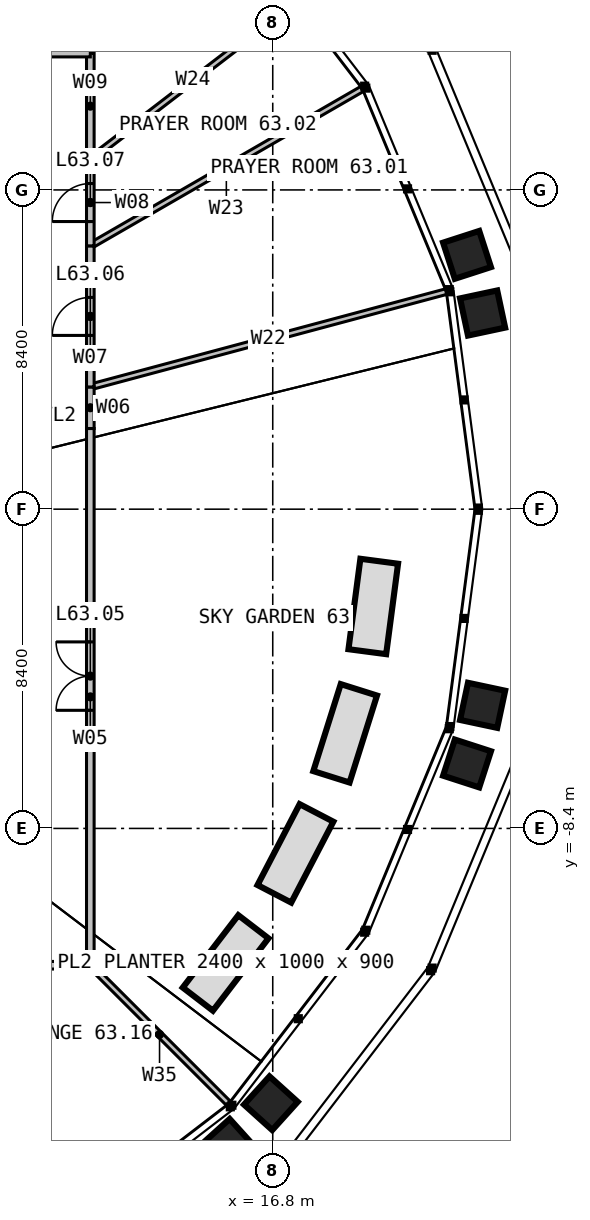
"""IFC4 building model, lengths in metres.
Left out: names, types, materials, properties, quantities, classifications, styles, units other than length and angle.
Written with IfcOpenShell. Run it as: python <this file> out.ifc"""

import sys

from ifc_helpers import new_model, si_unit, direction, frame, frame_2d, origin, place, context, subcontext, project, spatial, rectangle, extrude, element, fill, save


model = new_model("IFC4")
c1 = context("Model", 3, precision=1e-05, world=origin(), true_north=direction((0.0, 1.0)))
c2 = subcontext(c1, "Body", "Model", "MODEL_VIEW")
j1 = project(units=[si_unit("LENGTHUNIT", "METRE"), si_unit("PLANEANGLEUNIT", "RADIAN")], contexts=[c1])
p1 = place(None, origin())
s1 = spatial("IfcSite", under=j1, at=p1, CompositionType="ELEMENT")
p2 = place(p1, origin())
s2 = spatial("IfcBuilding", under=s1, at=p2, CompositionType="ELEMENT")
p3 = place(p2, frame((0.0, 0.0, 260.0)))
s3 = spatial("IfcBuildingStorey", under=s2, at=p3, CompositionType="ELEMENT", Elevation=260.0)
p4 = place(p3, frame((12.0, -12.0, 0.0), z_axis=(0.0, 0.0, 1.0), x_axis=(0.707106781187, -0.707106781187, 0.0)))
e1 = element("IfcWall", 1, at=p4, inside=s3, PredefinedType="PARTITIONING", context=c2, shape_type="SweptSolid", body=[
    extrude(rectangle(XDim=5.152, YDim=0.15, at=frame_2d((2.576, 0.0))), origin(), (0.0, 0.0, 1.0), 2.79),
])
p5 = place(p3, frame((12.0, 3.215, 0.0), z_axis=(0.0, 0.0, 1.0), x_axis=(0.965925916664, 0.258818707819, 0.0)))
e2 = element("IfcWall", 2, at=p5, inside=s3, PredefinedType="PARTITIONING", context=c2, shape_type="SweptSolid", body=[
    extrude(rectangle(XDim=9.699, YDim=0.15, at=frame_2d((4.85, 0.0))), origin(), (0.0, 0.0, 1.0), 2.79),
])
p6 = place(p3, frame((12.0, 6.928, 0.0), z_axis=(0.0, 0.0, 1.0), x_axis=(0.86603163534, 0.499989206474, 0.0)))
e3 = element("IfcWall", 3, at=p6, inside=s3, PredefinedType="PARTITIONING", context=c2, shape_type="SweptSolid", body=[
    extrude(rectangle(XDim=8.266, YDim=0.15, at=frame_2d((4.133, 0.0))), origin(), (0.0, 0.0, 1.0), 2.79),
])
p7 = place(p3, frame((12.0, 9.208, 0.0), z_axis=(0.0, 0.0, 1.0), x_axis=(0.793354038351, 0.608760519279, 0.0)))
e4 = element("IfcWall", 4, at=p7, inside=s3, PredefinedType="PARTITIONING", context=c2, shape_type="SweptSolid", body=[
    extrude(rectangle(XDim=6.807, YDim=0.15, at=frame_2d((3.404, 0.0))), origin(), (0.0, 0.0, 1.0), 2.79),
])
for number, where, z_axis, x_axis in (
    (5, (6.928, 12.0, 0.0), (0.0, 0.0, 1.0), (0.5, 0.866, 0.0)),
    (6, (6.928, -12.0, 0.0), (0.0, 0.0, 1.0), (0.5, -0.866, 0.0)),
):
    element("IfcWall", number, at=place(p3, frame(where, z_axis=z_axis, x_axis=x_axis)), inside=s3, PredefinedType="PARTITIONING", context=c2, shape_type="SweptSolid", body=[
        extrude(rectangle(XDim=8.266, YDim=0.15, at=frame_2d((4.133, 0.0))), origin(), (0.0, 0.0, 1.0), 2.79),
    ])
p8 = place(p3, frame((12.0, -12.0, 0.0), z_axis=(0.0, 0.0, 1.0), x_axis=(0.0, 1.0, 0.0)))
e7 = element("IfcWall", 7, at=p8, inside=s3, PredefinedType="PARTITIONING", context=c2, shape_type="SweptSolid", body=[
    extrude(rectangle(XDim=14.123, YDim=0.2, at=frame_2d((7.061, 0.0))), origin(), (0.0, 0.0, 1.0), 3.2),
])
p9 = place(p8, frame((6.708, 0.0, 0.0)))
e8 = element("IfcOpeningElement", 8, at=p9, cuts=e7, PredefinedType="OPENING", context=c2, shape_type="SweptSolid", body=[
    extrude(rectangle(XDim=1.8, YDim=2.2, at=frame_2d((0.9, 1.1))), frame((0.0, 0.11, 0.0), z_axis=(0.0, -1.0, 0.0), x_axis=(1.0, 0.0, 0.0)), (0.0, 0.0, 1.0), 0.22),
])
p10 = place(p3, frame((12.0, 2.123, 0.0), z_axis=(0.0, 0.0, 1.0), x_axis=(0.0, 1.0, 0.0)))
e9 = element("IfcWall", 9, at=p10, inside=s3, PredefinedType="PARTITIONING", context=c2, shape_type="SweptSolid", body=[
    extrude(rectangle(XDim=1.093, YDim=0.2, at=frame_2d((0.546, 0.0))), origin(), (0.0, 0.0, 1.0), 3.8),
])
p11 = place(p3, frame((12.0, 3.215, 0.0), z_axis=(0.0, 0.0, 1.0), x_axis=(0.0, 1.0, 0.0)))
e10 = element("IfcWall", 10, at=p11, inside=s3, PredefinedType="PARTITIONING", context=c2, shape_type="SweptSolid", body=[
    extrude(rectangle(XDim=3.713, YDim=0.2, at=frame_2d((1.856, 0.0))), origin(), (0.0, 0.0, 1.0), 3.8),
])
p12 = place(p11, frame((1.356, 0.0, 0.0)))
e11 = element("IfcOpeningElement", 11, at=p12, cuts=e10, PredefinedType="OPENING", context=c2, shape_type="SweptSolid", body=[
    extrude(rectangle(XDim=1.0, YDim=2.2, at=frame_2d((0.5, 1.1))), frame((0.0, 0.11, 0.0), z_axis=(0.0, -1.0, 0.0), x_axis=(1.0, 0.0, 0.0)), (0.0, 0.0, 1.0), 0.22),
])
p13 = place(p3, frame((12.0, 6.928, 0.0), z_axis=(0.0, 0.0, 1.0), x_axis=(0.0, 1.0, 0.0)))
e12 = element("IfcWall", 12, at=p13, inside=s3, PredefinedType="PARTITIONING", context=c2, shape_type="SweptSolid", body=[
    extrude(rectangle(XDim=2.28, YDim=0.2, at=frame_2d((1.14, 0.0))), origin(), (0.0, 0.0, 1.0), 3.8),
])
p14 = place(p13, frame((0.64, 0.0, 0.0)))
e13 = element("IfcOpeningElement", 13, at=p14, cuts=e12, PredefinedType="OPENING", context=c2, shape_type="SweptSolid", body=[
    extrude(rectangle(XDim=1.0, YDim=2.2, at=frame_2d((0.5, 1.1))), frame((0.0, 0.11, 0.0), z_axis=(0.0, -1.0, 0.0), x_axis=(1.0, 0.0, 0.0)), (0.0, 0.0, 1.0), 0.22),
])
p15 = place(p3, frame((12.0, 9.208, 0.0), z_axis=(0.0, 0.0, 1.0), x_axis=(0.0, 1.0, 0.0)))
e14 = element("IfcWall", 14, at=p15, inside=s3, PredefinedType="PARTITIONING", context=c2, shape_type="SweptSolid", body=[
    extrude(rectangle(XDim=2.792, YDim=0.2, at=frame_2d((1.396, 0.0))), origin(), (0.0, 0.0, 1.0), 3.8),
])
p16 = place(p3, frame((12.0, 12.0, 0.0), z_axis=(0.0, 0.0, 1.0), x_axis=(-1.0, 0.0, 0.0)))
e15 = element("IfcWall", 15, at=p16, inside=s3, PredefinedType="PARTITIONING", context=c2, shape_type="SweptSolid", body=[
    extrude(rectangle(XDim=5.072, YDim=0.2, at=frame_2d((2.536, 0.0))), origin(), (0.0, 0.0, 1.0), 3.8),
])
p17 = place(p16, frame((2.036, 0.0, 0.0)))
e16 = element("IfcOpeningElement", 16, at=p17, cuts=e15, PredefinedType="OPENING", context=c2, shape_type="SweptSolid", body=[
    extrude(rectangle(XDim=1.0, YDim=2.2, at=frame_2d((0.5, 1.1))), frame((0.0, 0.11, 0.0), z_axis=(0.0, -1.0, 0.0), x_axis=(1.0, 0.0, 0.0)), (0.0, 0.0, 1.0), 0.22),
])
p18 = place(p3, frame((6.928, -12.0, 0.0), z_axis=(0.0, 0.0, 1.0), x_axis=(1.0, 0.0, 0.0)))
e17 = element("IfcWall", 17, at=p18, inside=s3, PredefinedType="PARTITIONING", context=c2, shape_type="SweptSolid", body=[
    extrude(rectangle(XDim=5.072, YDim=0.2, at=frame_2d((2.536, 0.0))), origin(), (0.0, 0.0, 1.0), 3.8),
])
p19 = place(p18, frame((1.636, 0.0, 0.0)))
e18 = element("IfcOpeningElement", 18, at=p19, cuts=e17, PredefinedType="OPENING", context=c2, shape_type="SweptSolid", body=[
    extrude(rectangle(XDim=1.8, YDim=2.2, at=frame_2d((0.9, 1.1))), frame((0.0, 0.11, 0.0), z_axis=(0.0, -1.0, 0.0), x_axis=(1.0, 0.0, 0.0)), (0.0, 0.0, 1.0), 0.22),
])
p20 = place(p9, origin())
e19 = element("IfcDoor", 19, at=p20, inside=s3, OperationType="DOUBLE_DOOR_SINGLE_SWING", PredefinedType="DOOR", context=c2, shape_type="SweptSolid", body=[
    extrude(rectangle(XDim=1.8, YDim=2.2, at=frame_2d((0.9, 1.1))), frame((0.0, 0.025, 0.0), z_axis=(0.0, -1.0, 0.0), x_axis=(1.0, 0.0, 0.0)), (0.0, 0.0, 1.0), 0.05),
])
fill(e8, e19)
p21 = place(p12, origin())
e20 = element("IfcDoor", 20, at=p21, inside=s3, OperationType="SINGLE_SWING_LEFT", PredefinedType="DOOR", context=c2, shape_type="SweptSolid", body=[
    extrude(rectangle(XDim=1.0, YDim=2.2, at=frame_2d((0.5, 1.1))), frame((0.0, 0.025, 0.0), z_axis=(0.0, -1.0, 0.0), x_axis=(1.0, 0.0, 0.0)), (0.0, 0.0, 1.0), 0.05),
])
fill(e11, e20)
p22 = place(p14, origin())
e21 = element("IfcDoor", 21, at=p22, inside=s3, OperationType="SINGLE_SWING_LEFT", PredefinedType="DOOR", context=c2, shape_type="SweptSolid", body=[
    extrude(rectangle(XDim=1.0, YDim=2.2, at=frame_2d((0.5, 1.1))), frame((0.0, 0.025, 0.0), z_axis=(0.0, -1.0, 0.0), x_axis=(1.0, 0.0, 0.0)), (0.0, 0.0, 1.0), 0.05),
])
fill(e13, e21)
save(model, sys.argv[1])
